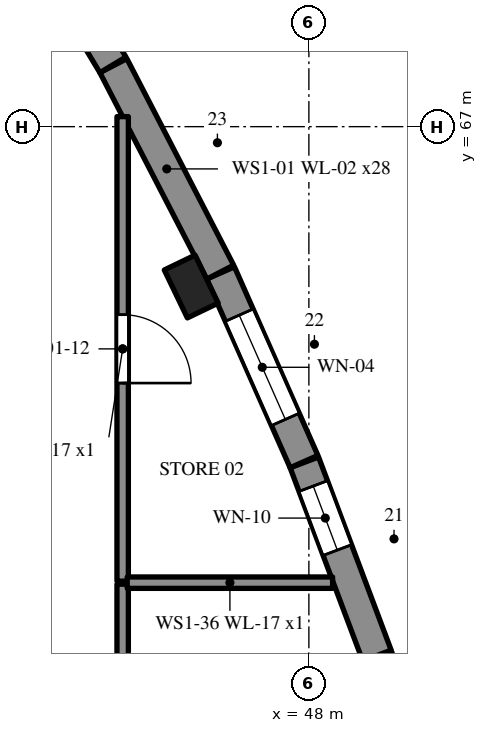
"""IFC4 building model, lengths in metres.
Left out: names, types, materials, properties, quantities, classifications, styles, units other than length and angle.
Written with IfcOpenShell. Run it as: python <this file> out.ifc"""

import sys

from ifc_helpers import new_model, si_unit, direction, frame, frame_2d, origin, origin_2d, place, context, subcontext, project, spatial, rectangle, extrude, element, fill, save


model = new_model("IFC4")
c1 = context("Model", 3, precision=1e-05, world=origin(), true_north=direction((0.0, 1.0)))
c2 = subcontext(c1, "Body", "Model", "MODEL_VIEW")
j1 = project(units=[si_unit("LENGTHUNIT", "METRE"), si_unit("PLANEANGLEUNIT", "RADIAN")], contexts=[c1])
p1 = place(None, origin())
s1 = spatial("IfcSite", under=j1, at=p1, CompositionType="ELEMENT")
p2 = place(p1, origin())
s2 = spatial("IfcBuilding", under=s1, at=p2, CompositionType="ELEMENT")
p3 = place(p2, frame((0.0, 0.0, 5.4)))
s3 = spatial("IfcBuildingStorey", under=s2, at=p3, CompositionType="ELEMENT", Elevation=5.4)
p4 = place(p3, frame((49.708, 57.44, 0.0), z_axis=(0.0, 0.0, 1.0), x_axis=(-0.29795748067, 0.954579142718, 0.0)))
e1 = element("IfcWall", 1, at=p4, inside=s3, PredefinedType="SOLIDWALL", context=c2, shape_type="SweptSolid", body=[
    extrude(rectangle(XDim=2.715, YDim=0.4, at=frame_2d((1.357, 0.0))), origin(), (0.0, 0.0, 1.0), 4.5),
])
p5 = place(p4, frame((0.15, 0.0, 0.0)))
e2 = element("IfcOpeningElement", 2, at=p5, cuts=e1, PredefinedType="OPENING", context=c2, shape_type="SweptSolid", body=[
    extrude(rectangle(XDim=1.8, YDim=2.1, at=frame_2d((0.9, 1.05))), frame((0.0, 0.21, 0.0), z_axis=(0.0, -1.0, 0.0), x_axis=(1.0, 0.0, 0.0)), (0.0, 0.0, 1.0), 0.42),
])
p6 = place(p3, frame((48.896, 60.042, 0.0), z_axis=(0.0, 0.0, 1.0), x_axis=(-0.351862601417, 0.936051659752, 0.0)))
e3 = element("IfcWall", 3, at=p6, inside=s3, PredefinedType="SOLIDWALL", context=c2, shape_type="SweptSolid", body=[
    extrude(rectangle(XDim=2.714, YDim=0.4, at=frame_2d((1.357, 0.0))), origin(), (0.0, 0.0, 1.0), 4.5),
])
p7 = place(p6, frame((1.482, 0.0, 0.9)))
e4 = element("IfcOpeningElement", 4, at=p7, cuts=e3, PredefinedType="OPENING", context=c2, shape_type="SweptSolid", body=[
    extrude(rectangle(XDim=0.9, YDim=2.1, at=frame_2d((0.45, 1.05))), frame((0.0, 0.21, 0.0), z_axis=(0.0, -1.0, 0.0), x_axis=(1.0, 0.0, 0.0)), (0.0, 0.0, 1.0), 0.42),
])
p8 = place(p3, frame((47.936, 62.593, 0.0), z_axis=(0.0, 0.0, 1.0), x_axis=(-0.404652153757, 0.914470685402, 0.0)))
e5 = element("IfcWall", 5, at=p8, inside=s3, PredefinedType="SOLIDWALL", context=c2, shape_type="SweptSolid", body=[
    extrude(rectangle(XDim=2.714, YDim=0.4, at=frame_2d((1.357, 0.0))), origin(), (0.0, 0.0, 1.0), 4.5),
])
p9 = place(p8, frame((0.607, 0.0, 2.4)))
e6 = element("IfcOpeningElement", 6, at=p9, cuts=e5, PredefinedType="OPENING", context=c2, shape_type="SweptSolid", body=[
    extrude(rectangle(XDim=1.5, YDim=0.9, at=frame_2d((0.75, 0.45))), frame((0.0, 0.21, 0.0), z_axis=(0.0, -1.0, 0.0), x_axis=(1.0, 0.0, 0.0)), (0.0, 0.0, 1.0), 0.42),
])
p10 = place(p3, frame((46.833, 65.086, 0.0), z_axis=(0.0, 0.0, 1.0), x_axis=(-0.45930565039, 0.888278289457, 0.0)))
e7 = element("IfcWall", 7, at=p10, inside=s3, PredefinedType="SOLIDWALL", context=c2, shape_type="SweptSolid", body=[
    extrude(rectangle(XDim=3.059, YDim=0.4, at=frame_2d((1.529, 0.0))), origin(), (0.0, 0.0, 1.0), 4.5),
])
p11 = place(p3, frame((45.422, 67.814, 0.0), z_axis=(0.0, 0.0, 1.0), x_axis=(-0.515387841983, 0.856957042293, 0.0)))
e8 = element("IfcWall", 8, at=p11, inside=s3, PredefinedType="SOLIDWALL", context=c2, shape_type="SweptSolid", body=[
    extrude(rectangle(XDim=3.058, YDim=0.4, at=frame_2d((1.529, 0.0))), origin(), (0.0, 0.0, 1.0), 4.5),
])
p12 = place(p3, frame((46.452, 64.896, 0.0), z_axis=(0.0, 0.0, 1.0), x_axis=(-0.433813735983, 0.901002576285, 0.0)))
e9 = element("IfcColumn", 9, at=p12, inside=s3, PredefinedType="PILASTER", context=c2, shape_type="SweptSolid", body=[
    extrude(rectangle(XDim=0.7, YDim=0.45, at=origin_2d()), origin(), (0.0, 0.0, 1.0), 4.5),
])
p13 = place(p3, frame((45.55, 60.98, 0.0), z_axis=(0.0, 0.0, 1.0), x_axis=(0.0, -1.0, 0.0)))
e10 = element("IfcWall", 10, at=p13, inside=s3, PredefinedType="PARTITIONING", context=c2, shape_type="SweptSolid", body=[
    extrude(rectangle(XDim=5.76, YDim=0.15, at=frame_2d((2.88, 0.0))), origin(), (0.0, 0.0, 1.0), 4.5),
])
p14 = place(p13, frame((2.43, 0.0, 0.0)))
e11 = element("IfcOpeningElement", 11, at=p14, cuts=e10, PredefinedType="OPENING", context=c2, shape_type="SweptSolid", body=[
    extrude(rectangle(XDim=0.9, YDim=2.1, at=frame_2d((0.45, 1.05))), frame((0.0, 0.085, 0.0), z_axis=(0.0, -1.0, 0.0), x_axis=(1.0, 0.0, 0.0)), (0.0, 0.0, 1.0), 0.17),
])
p15 = place(p3, frame((45.55, 67.132, 0.0), z_axis=(0.0, 0.0, 1.0), x_axis=(0.0, -1.0, 0.0)))
e12 = element("IfcWall", 12, at=p15, inside=s3, PredefinedType="PARTITIONING", context=c2, shape_type="SweptSolid", body=[
    extrude(rectangle(XDim=6.112, YDim=0.15, at=frame_2d((3.056, 0.0))), origin(), (0.0, 0.0, 1.0), 4.5),
])
p16 = place(p15, frame((2.606, 0.0, 0.0)))
e13 = element("IfcOpeningElement", 13, at=p16, cuts=e12, PredefinedType="OPENING", context=c2, shape_type="SweptSolid", body=[
    extrude(rectangle(XDim=0.9, YDim=2.1, at=frame_2d((0.45, 1.05))), frame((0.0, 0.085, 0.0), z_axis=(0.0, -1.0, 0.0), x_axis=(1.0, 0.0, 0.0)), (0.0, 0.0, 1.0), 0.17),
])
p17 = place(p3, frame((45.61, 61.0, 0.0), z_axis=(0.0, 0.0, 1.0), x_axis=(1.0, 0.0, 0.0)))
e14 = element("IfcWall", 14, at=p17, inside=s3, PredefinedType="PARTITIONING", context=c2, shape_type="SweptSolid", body=[
    extrude(rectangle(XDim=2.702, YDim=0.15, at=frame_2d((1.351, 0.0))), origin(), (0.0, 0.0, 1.0), 4.5),
])
p18 = place(p7, origin())
e15 = element("IfcWindow", 15, at=p18, inside=s3, PartitioningType="SINGLE_PANEL", PredefinedType="WINDOW", context=c2, shape_type="SweptSolid", body=[
    extrude(rectangle(XDim=0.9, YDim=2.1, at=frame_2d((0.45, 1.05))), frame((0.0, 0.03, 0.0), z_axis=(0.0, -1.0, 0.0), x_axis=(1.0, 0.0, 0.0)), (0.0, 0.0, 1.0), 0.06),
])
fill(e4, e15)
p19 = place(p9, origin())
e16 = element("IfcWindow", 16, at=p19, inside=s3, PartitioningType="SINGLE_PANEL", PredefinedType="WINDOW", context=c2, shape_type="SweptSolid", body=[
    extrude(rectangle(XDim=1.5, YDim=0.9, at=frame_2d((0.75, 0.45))), frame((0.0, 0.03, 0.0), z_axis=(0.0, -1.0, 0.0), x_axis=(1.0, 0.0, 0.0)), (0.0, 0.0, 1.0), 0.06),
])
fill(e6, e16)
p20 = place(p16, origin())
e17 = element("IfcDoor", 17, at=p20, inside=s3, OperationType="SINGLE_SWING_RIGHT", PredefinedType="DOOR", context=c2, shape_type="SweptSolid", body=[
    extrude(rectangle(XDim=0.9, YDim=2.1, at=frame_2d((0.45, 1.05))), frame((0.0, 0.025, 0.0), z_axis=(0.0, -1.0, 0.0), x_axis=(1.0, 0.0, 0.0)), (0.0, 0.0, 1.0), 0.05),
])
fill(e13, e17)
save(model, sys.argv[1])
